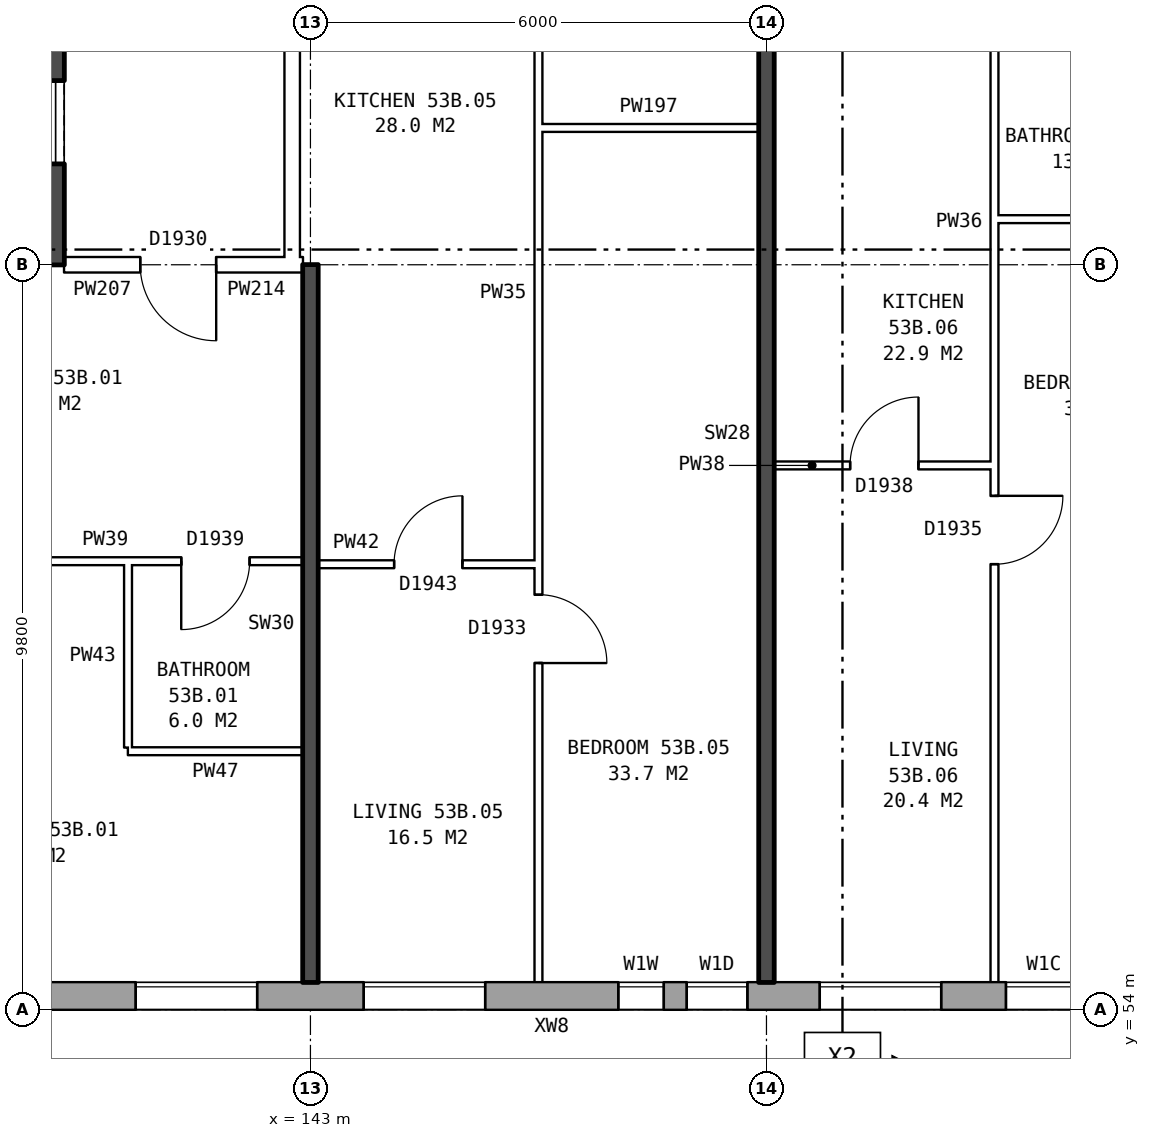
"""IFC4 building model, lengths in metres.
Left out: names, types, materials, properties, quantities, classifications, styles, units other than length and angle.
Written with IfcOpenShell. Run it as: python <this file> out.ifc"""

import sys

from ifc_helpers import new_model, si_unit, direction, frame, frame_2d, origin, place, context, subcontext, project, spatial, rectangle, extrude, element, fill, save


model = new_model("IFC4")
c1 = context("Model", 3, precision=1e-05, world=origin(), true_north=direction((0.0, 1.0)))
c2 = subcontext(c1, "Body", "Model", "MODEL_VIEW")
j1 = project(units=[si_unit("LENGTHUNIT", "METRE"), si_unit("PLANEANGLEUNIT", "RADIAN")], contexts=[c1])
p1 = place(None, origin())
s1 = spatial("IfcSite", under=j1, at=p1, CompositionType="ELEMENT")
p2 = place(p1, origin())
s2 = spatial("IfcBuilding", under=s1, at=p2, CompositionType="ELEMENT")
p3 = place(p2, frame((0.0, 0.0, 188.2)))
s3 = spatial("IfcBuildingStorey", under=s2, at=p3, CompositionType="ELEMENT", Elevation=188.2)
p4 = place(p3, frame((134.075, 54.18, 0.0), z_axis=(0.0, 0.0, 1.0), x_axis=(1.0, 0.0, 0.0)))
e1 = element("IfcWall", 1, at=p4, inside=s3, PredefinedType="STANDARD", context=c2, shape_type="SweptSolid", body=[
    extrude(rectangle(XDim=33.101, YDim=0.36, at=frame_2d((16.55, 0.0))), origin(), (0.0, 0.0, 1.0), 2.85),
])
p5 = place(p4, frame((0.625, 0.0, 0.8)))
e2 = element("IfcOpeningElement", 2, at=p5, cuts=e1, PredefinedType="OPENING", context=c2, shape_type="SweptSolid", body=[
    extrude(rectangle(XDim=1.6, YDim=1.8, at=frame_2d((0.8, 0.9))), frame((0.0, 0.19, 0.0), z_axis=(0.0, -1.0, 0.0), x_axis=(1.0, 0.0, 0.0)), (0.0, 0.0, 1.0), 0.38),
])
p6 = place(p4, frame((3.625, 0.0, 0.8)))
e3 = element("IfcOpeningElement", 3, at=p6, cuts=e1, PredefinedType="OPENING", context=c2, shape_type="SweptSolid", body=[
    extrude(rectangle(XDim=1.6, YDim=1.8, at=frame_2d((0.8, 0.9))), frame((0.0, 0.19, 0.0), z_axis=(0.0, -1.0, 0.0), x_axis=(1.0, 0.0, 0.0)), (0.0, 0.0, 1.0), 0.38),
])
p7 = place(p4, frame((6.625, 0.0, 0.8)))
e4 = element("IfcOpeningElement", 4, at=p7, cuts=e1, PredefinedType="OPENING", context=c2, shape_type="SweptSolid", body=[
    extrude(rectangle(XDim=1.6, YDim=1.8, at=frame_2d((0.8, 0.9))), frame((0.0, 0.19, 0.0), z_axis=(0.0, -1.0, 0.0), x_axis=(1.0, 0.0, 0.0)), (0.0, 0.0, 1.0), 0.38),
])
p8 = place(p4, frame((9.625, 0.0, 0.8)))
e5 = element("IfcOpeningElement", 5, at=p8, cuts=e1, PredefinedType="OPENING", context=c2, shape_type="SweptSolid", body=[
    extrude(rectangle(XDim=1.6, YDim=1.8, at=frame_2d((0.8, 0.9))), frame((0.0, 0.19, 0.0), z_axis=(0.0, -1.0, 0.0), x_axis=(1.0, 0.0, 0.0)), (0.0, 0.0, 1.0), 0.38),
])
p9 = place(p4, frame((12.975, 0.0, 0.15)))
e6 = element("IfcOpeningElement", 6, at=p9, cuts=e1, PredefinedType="OPENING", context=c2, shape_type="SweptSolid", body=[
    extrude(rectangle(XDim=0.6, YDim=0.9, at=frame_2d((0.3, 0.45))), frame((0.0, 0.19, 0.0), z_axis=(0.0, -1.0, 0.0), x_axis=(1.0, 0.0, 0.0)), (0.0, 0.0, 1.0), 0.38),
])
p10 = place(p4, frame((15.625, 0.0, 0.8)))
e7 = element("IfcOpeningElement", 7, at=p10, cuts=e1, PredefinedType="OPENING", context=c2, shape_type="SweptSolid", body=[
    extrude(rectangle(XDim=1.6, YDim=1.8, at=frame_2d((0.8, 0.9))), frame((0.0, 0.19, 0.0), z_axis=(0.0, -1.0, 0.0), x_axis=(1.0, 0.0, 0.0)), (0.0, 0.0, 1.0), 0.38),
])
p11 = place(p4, frame((18.075, 0.0, 0.45)))
e8 = element("IfcOpeningElement", 8, at=p11, cuts=e1, PredefinedType="OPENING", context=c2, shape_type="SweptSolid", body=[
    extrude(rectangle(XDim=1.0, YDim=1.8, at=frame_2d((0.5, 0.9))), frame((0.0, 0.19, 0.0), z_axis=(0.0, -1.0, 0.0), x_axis=(1.0, 0.0, 0.0)), (0.0, 0.0, 1.0), 0.38),
])
p12 = place(p4, frame((21.625, 0.0, 0.8)))
e9 = element("IfcOpeningElement", 9, at=p12, cuts=e1, PredefinedType="OPENING", context=c2, shape_type="SweptSolid", body=[
    extrude(rectangle(XDim=1.6, YDim=1.8, at=frame_2d((0.8, 0.9))), frame((0.0, 0.19, 0.0), z_axis=(0.0, -1.0, 0.0), x_axis=(1.0, 0.0, 0.0)), (0.0, 0.0, 1.0), 0.38),
])
p13 = place(p4, frame((24.625, 0.0, 0.8)))
e10 = element("IfcOpeningElement", 10, at=p13, cuts=e1, PredefinedType="OPENING", context=c2, shape_type="SweptSolid", body=[
    extrude(rectangle(XDim=1.6, YDim=1.8, at=frame_2d((0.8, 0.9))), frame((0.0, 0.19, 0.0), z_axis=(0.0, -1.0, 0.0), x_axis=(1.0, 0.0, 0.0)), (0.0, 0.0, 1.0), 0.38),
])
p14 = place(p4, frame((27.625, 0.0, 0.8)))
e11 = element("IfcOpeningElement", 11, at=p14, cuts=e1, PredefinedType="OPENING", context=c2, shape_type="SweptSolid", body=[
    extrude(rectangle(XDim=1.6, YDim=1.8, at=frame_2d((0.8, 0.9))), frame((0.0, 0.19, 0.0), z_axis=(0.0, -1.0, 0.0), x_axis=(1.0, 0.0, 0.0)), (0.0, 0.0, 1.0), 0.38),
])
p15 = place(p4, frame((30.625, 0.0, 0.8)))
e12 = element("IfcOpeningElement", 12, at=p15, cuts=e1, PredefinedType="OPENING", context=c2, shape_type="SweptSolid", body=[
    extrude(rectangle(XDim=1.6, YDim=1.8, at=frame_2d((0.8, 0.9))), frame((0.0, 0.19, 0.0), z_axis=(0.0, -1.0, 0.0), x_axis=(1.0, 0.0, 0.0)), (0.0, 0.0, 1.0), 0.38),
])
p16 = place(p4, frame((13.875, 0.0, 0.25)))
e13 = element("IfcOpeningElement", 13, at=p16, cuts=e1, PredefinedType="OPENING", context=c2, shape_type="SweptSolid", body=[
    extrude(rectangle(XDim=0.8, YDim=1.8, at=frame_2d((0.4, 0.9))), frame((0.0, 0.19, 0.0), z_axis=(0.0, -1.0, 0.0), x_axis=(1.0, 0.0, 0.0)), (0.0, 0.0, 1.0), 0.38),
])
p17 = place(p4, frame((19.375, 0.0, 0.35)))
e14 = element("IfcOpeningElement", 14, at=p17, cuts=e1, PredefinedType="OPENING", context=c2, shape_type="SweptSolid", body=[
    extrude(rectangle(XDim=0.6, YDim=0.9, at=frame_2d((0.3, 0.45))), frame((0.0, 0.19, 0.0), z_axis=(0.0, -1.0, 0.0), x_axis=(1.0, 0.0, 0.0)), (0.0, 0.0, 1.0), 0.38),
])
p18 = place(p3, frame((139.535, 63.8, 0.0), z_axis=(0.0, 0.0, 1.0), x_axis=(0.0, 1.0, 0.0)))
e15 = element("IfcWall", 15, at=p18, inside=s3, PredefinedType="SHEAR", context=c2, shape_type="SweptSolid", body=[
    extrude(rectangle(XDim=12.4, YDim=0.45, at=frame_2d((6.2, 0.0))), origin(), (0.0, 0.0, 1.0), 2.85),
])
p19 = place(p18, frame((1.325, 0.0, 0.0)))
e16 = element("IfcOpeningElement", 16, at=p19, cuts=e15, PredefinedType="OPENING", context=c2, shape_type="SweptSolid", body=[
    extrude(rectangle(XDim=1.1, YDim=2.1, at=frame_2d((0.55, 1.05))), frame((0.0, 0.235, 0.0), z_axis=(0.0, -1.0, 0.0), x_axis=(1.0, 0.0, 0.0)), (0.0, 0.0, 1.0), 0.47),
])
p20 = place(p18, frame((3.6, 0.0, 0.0)))
e17 = element("IfcOpeningElement", 17, at=p20, cuts=e15, PredefinedType="OPENING", context=c2, shape_type="SweptSolid", body=[
    extrude(rectangle(XDim=1.1, YDim=2.1, at=frame_2d((0.55, 1.05))), frame((0.0, 0.235, 0.0), z_axis=(0.0, -1.0, 0.0), x_axis=(1.0, 0.0, 0.0)), (0.0, 0.0, 1.0), 0.47),
])
p21 = place(p18, frame((5.8, 0.0, 0.0)))
e18 = element("IfcOpeningElement", 18, at=p21, cuts=e15, PredefinedType="OPENING", context=c2, shape_type="SweptSolid", body=[
    extrude(rectangle(XDim=1.1, YDim=2.1, at=frame_2d((0.55, 1.05))), frame((0.0, 0.235, 0.0), z_axis=(0.0, -1.0, 0.0), x_axis=(1.0, 0.0, 0.0)), (0.0, 0.0, 1.0), 0.47),
])
p22 = place(p18, frame((9.9, 0.0, 0.0)))
e19 = element("IfcOpeningElement", 19, at=p22, cuts=e15, PredefinedType="OPENING", context=c2, shape_type="SweptSolid", body=[
    extrude(rectangle(XDim=1.1, YDim=2.1, at=frame_2d((0.55, 1.05))), frame((0.0, 0.235, 0.0), z_axis=(0.0, -1.0, 0.0), x_axis=(1.0, 0.0, 0.0)), (0.0, 0.0, 1.0), 0.47),
])
p23 = place(p18, frame((8.125, 0.0, 0.0)))
e20 = element("IfcOpeningElement", 20, at=p23, cuts=e15, PredefinedType="OPENING", context=c2, shape_type="SweptSolid", body=[
    extrude(rectangle(XDim=0.85, YDim=2.1, at=frame_2d((0.425, 1.05))), frame((0.0, 0.235, 0.0), z_axis=(0.0, -1.0, 0.0), x_axis=(1.0, 0.0, 0.0)), (0.0, 0.0, 1.0), 0.47),
])
p24 = place(p3, frame((142.76, 63.9, 0.0), z_axis=(0.0, 0.0, 1.0), x_axis=(0.0, 1.0, 0.0)))
e21 = element("IfcWall", 21, at=p24, inside=s3, PredefinedType="PARTITIONING", context=c2, shape_type="SweptSolid", body=[
    extrude(rectangle(XDim=12.2, YDim=0.2, at=frame_2d((6.1, 0.0))), origin(), (0.0, 0.0, 1.0), 2.85),
])
p25 = place(p24, frame((5.1, 0.0, 0.0)))
e22 = element("IfcOpeningElement", 22, at=p25, cuts=e21, PredefinedType="OPENING", context=c2, shape_type="SweptSolid", body=[
    extrude(rectangle(XDim=2.0, YDim=2.1, at=frame_2d((1.0, 1.05))), frame((0.0, 0.11, 0.0), z_axis=(0.0, -1.0, 0.0), x_axis=(1.0, 0.0, 0.0)), (0.0, 0.0, 1.0), 0.22),
])
p26 = place(p3, frame((140.6, 57.4, 0.0), z_axis=(0.0, 0.0, 1.0), x_axis=(1.0, 0.0, 0.0)))
e23 = element("IfcWall", 23, at=p26, inside=s3, PredefinedType="PARTITIONING", context=c2, shape_type="SweptSolid", body=[
    extrude(rectangle(XDim=2.3, YDim=0.1, at=frame_2d((1.15, 0.0))), origin(), (0.0, 0.0, 1.0), 2.85),
])
p27 = place(p3, frame((143.1, 59.86, 0.0), z_axis=(0.0, 0.0, 1.0), x_axis=(1.0, 0.0, 0.0)))
e24 = element("IfcWall", 24, at=p27, inside=s3, PredefinedType="PARTITIONING", context=c2, shape_type="SweptSolid", body=[
    extrude(rectangle(XDim=2.9, YDim=0.1, at=frame_2d((1.45, 0.0))), origin(), (0.0, 0.0, 1.0), 2.85),
])
p28 = place(p27, frame((1.0, 0.0, 0.0)))
e25 = element("IfcOpeningElement", 25, at=p28, cuts=e24, PredefinedType="OPENING", context=c2, shape_type="SweptSolid", body=[
    extrude(rectangle(XDim=0.9, YDim=2.1, at=frame_2d((0.45, 1.05))), frame((0.0, 0.06, 0.0), z_axis=(0.0, -1.0, 0.0), x_axis=(1.0, 0.0, 0.0)), (0.0, 0.0, 1.0), 0.12),
])
p29 = place(p3, frame((137.1, 59.9, 0.0), z_axis=(0.0, 0.0, 1.0), x_axis=(1.0, 0.0, 0.0)))
e26 = element("IfcWall", 26, at=p29, inside=s3, PredefinedType="PARTITIONING", context=c2, shape_type="SweptSolid", body=[
    extrude(rectangle(XDim=5.8, YDim=0.1, at=frame_2d((2.9, 0.0))), origin(), (0.0, 0.0, 1.0), 2.85),
])
p30 = place(p29, frame((1.3, 0.0, 0.0)))
e27 = element("IfcOpeningElement", 27, at=p30, cuts=e26, PredefinedType="OPENING", context=c2, shape_type="SweptSolid", body=[
    extrude(rectangle(XDim=0.9, YDim=2.1, at=frame_2d((0.45, 1.05))), frame((0.0, 0.06, 0.0), z_axis=(0.0, -1.0, 0.0), x_axis=(1.0, 0.0, 0.0)), (0.0, 0.0, 1.0), 0.12),
])
p31 = place(p29, frame((4.2, 0.0, 0.0)))
e28 = element("IfcOpeningElement", 28, at=p31, cuts=e26, PredefinedType="OPENING", context=c2, shape_type="SweptSolid", body=[
    extrude(rectangle(XDim=0.9, YDim=2.1, at=frame_2d((0.45, 1.05))), frame((0.0, 0.06, 0.0), z_axis=(0.0, -1.0, 0.0), x_axis=(1.0, 0.0, 0.0)), (0.0, 0.0, 1.0), 0.12),
])
p32 = place(p3, frame((149.1, 61.16, 0.0), z_axis=(0.0, 0.0, 1.0), x_axis=(1.0, 0.0, 0.0)))
e29 = element("IfcWall", 29, at=p32, inside=s3, PredefinedType="PARTITIONING", context=c2, shape_type="SweptSolid", body=[
    extrude(rectangle(XDim=2.9, YDim=0.1, at=frame_2d((1.45, 0.0))), origin(), (0.0, 0.0, 1.0), 2.85),
])
p33 = place(p32, frame((1.0, 0.0, 0.0)))
e30 = element("IfcOpeningElement", 30, at=p33, cuts=e29, PredefinedType="OPENING", context=c2, shape_type="SweptSolid", body=[
    extrude(rectangle(XDim=0.9, YDim=2.1, at=frame_2d((0.45, 1.05))), frame((0.0, 0.06, 0.0), z_axis=(0.0, -1.0, 0.0), x_axis=(1.0, 0.0, 0.0)), (0.0, 0.0, 1.0), 0.12),
])
p34 = place(p3, frame((139.76, 63.8, 0.0), z_axis=(0.0, 0.0, 1.0), x_axis=(1.0, 0.0, 0.0)))
e31 = element("IfcWall", 31, at=p34, inside=s3, PredefinedType="PARTITIONING", context=c2, shape_type="SweptSolid", body=[
    extrude(rectangle(XDim=3.0, YDim=0.2, at=frame_2d((1.5, 0.0))), origin(), (0.0, 0.0, 1.0), 2.85),
])
p35 = place(p34, frame((1.0, 0.0, 0.0)))
e32 = element("IfcOpeningElement", 32, at=p35, cuts=e31, PredefinedType="OPENING", context=c2, shape_type="SweptSolid", body=[
    extrude(rectangle(XDim=1.0, YDim=2.1, at=frame_2d((0.5, 1.05))), frame((0.0, 0.11, 0.0), z_axis=(0.0, -1.0, 0.0), x_axis=(1.0, 0.0, 0.0)), (0.0, 0.0, 1.0), 0.22),
])
p36 = place(p3, frame((142.76, 63.8, 0.0), z_axis=(0.0, 0.0, 1.0), x_axis=(1.0, 0.0, 0.0)))
e33 = element("IfcWall", 33, at=p36, inside=s3, PredefinedType="PARTITIONING", context=c2, shape_type="SweptSolid", body=[
    extrude(rectangle(XDim=0.14, YDim=0.2, at=frame_2d((0.07, 0.0))), origin(), (0.0, 0.0, 1.0), 2.85),
])
for number, where, z_axis, x_axis in (
    (34, (152.0, 64.4, 0.0), (0.0, 0.0, 1.0), (1.0, 0.0, 0.0)),
    (35, (146.0, 65.6, 0.0), (0.0, 0.0, 1.0), (1.0, 0.0, 0.0)),
):
    element("IfcWall", number, at=place(p3, frame(where, z_axis=z_axis, x_axis=x_axis)), inside=s3, PredefinedType="PARTITIONING", context=c2, shape_type="SweptSolid", body=[
        extrude(rectangle(XDim=2.9, YDim=0.1, at=frame_2d((1.45, 0.0))), origin(), (0.0, 0.0, 1.0), 2.85),
    ])
p37 = place(p3, frame((140.6, 57.45, 0.0), z_axis=(0.0, 0.0, 1.0), x_axis=(0.0, 1.0, 0.0)))
e36 = element("IfcWall", 36, at=p37, inside=s3, PredefinedType="PARTITIONING", context=c2, shape_type="SweptSolid", body=[
    extrude(rectangle(XDim=2.4, YDim=0.1, at=frame_2d((1.2, 0.0))), origin(), (0.0, 0.0, 1.0), 2.85),
])
p38 = place(p3, frame((143.0, 54.36, 0.0), z_axis=(0.0, 0.0, 1.0), x_axis=(0.0, 1.0, 0.0)))
e37 = element("IfcWall", 37, at=p38, inside=s3, PredefinedType="SOLIDWALL", context=c2, shape_type="SweptSolid", body=[
    extrude(rectangle(XDim=9.44, YDim=0.2, at=frame_2d((4.72, 0.0))), origin(), (0.0, 0.0, 1.0), 2.85),
])
p39 = place(p3, frame((146.0, 54.36, 0.0), z_axis=(0.0, 0.0, 1.0), x_axis=(0.0, 1.0, 0.0)))
e38 = element("IfcWall", 38, at=p39, inside=s3, PredefinedType="PARTITIONING", context=c2, shape_type="SweptSolid", body=[
    extrude(rectangle(XDim=14.34, YDim=0.1, at=frame_2d((7.17, 0.0))), origin(), (0.0, 0.0, 1.0), 2.85),
])
p40 = place(p39, frame((4.2, 0.0, 0.0)))
e39 = element("IfcOpeningElement", 39, at=p40, cuts=e38, PredefinedType="OPENING", context=c2, shape_type="SweptSolid", body=[
    extrude(rectangle(XDim=0.9, YDim=2.1, at=frame_2d((0.45, 1.05))), frame((0.0, 0.06, 0.0), z_axis=(0.0, -1.0, 0.0), x_axis=(1.0, 0.0, 0.0)), (0.0, 0.0, 1.0), 0.12),
])
p41 = place(p39, frame((13.04, 0.0, 0.0)))
e40 = element("IfcOpeningElement", 40, at=p41, cuts=e38, PredefinedType="OPENING", context=c2, shape_type="SweptSolid", body=[
    extrude(rectangle(XDim=0.9, YDim=2.1, at=frame_2d((0.45, 1.05))), frame((0.0, 0.06, 0.0), z_axis=(0.0, -1.0, 0.0), x_axis=(1.0, 0.0, 0.0)), (0.0, 0.0, 1.0), 0.12),
])
p42 = place(p3, frame((149.0, 54.36, 0.0), z_axis=(0.0, 0.0, 1.0), x_axis=(0.0, 1.0, 0.0)))
e41 = element("IfcWall", 41, at=p42, inside=s3, PredefinedType="SOLIDWALL", context=c2, shape_type="SweptSolid", body=[
    extrude(rectangle(XDim=14.44, YDim=0.2, at=frame_2d((7.22, 0.0))), origin(), (0.0, 0.0, 1.0), 2.85),
])
p43 = place(p3, frame((152.0, 54.36, 0.0), z_axis=(0.0, 0.0, 1.0), x_axis=(0.0, 1.0, 0.0)))
e42 = element("IfcWall", 42, at=p43, inside=s3, PredefinedType="PARTITIONING", context=c2, shape_type="SweptSolid", body=[
    extrude(rectangle(XDim=14.34, YDim=0.1, at=frame_2d((7.17, 0.0))), origin(), (0.0, 0.0, 1.0), 2.85),
])
p44 = place(p43, frame((5.5, 0.0, 0.0)))
e43 = element("IfcOpeningElement", 43, at=p44, cuts=e42, PredefinedType="OPENING", context=c2, shape_type="SweptSolid", body=[
    extrude(rectangle(XDim=0.9, YDim=2.1, at=frame_2d((0.45, 1.05))), frame((0.0, 0.06, 0.0), z_axis=(0.0, -1.0, 0.0), x_axis=(1.0, 0.0, 0.0)), (0.0, 0.0, 1.0), 0.12),
])
p45 = place(p43, frame((13.04, 0.0, 0.0)))
e44 = element("IfcOpeningElement", 44, at=p45, cuts=e42, PredefinedType="OPENING", context=c2, shape_type="SweptSolid", body=[
    extrude(rectangle(XDim=0.9, YDim=2.1, at=frame_2d((0.45, 1.05))), frame((0.0, 0.06, 0.0), z_axis=(0.0, -1.0, 0.0), x_axis=(1.0, 0.0, 0.0)), (0.0, 0.0, 1.0), 0.12),
])
p46 = place(p7, origin())
e45 = element("IfcWindow", 45, at=p46, inside=s3, PartitioningType="SINGLE_PANEL", PredefinedType="WINDOW", context=c2, shape_type="SweptSolid", body=[
    extrude(rectangle(XDim=1.6, YDim=1.8, at=frame_2d((0.8, 0.9))), frame((0.0, 0.15, 0.0), z_axis=(0.0, -1.0, 0.0), x_axis=(1.0, 0.0, 0.0)), (0.0, 0.0, 1.0), 0.06),
])
fill(e4, e45)
p47 = place(p8, origin())
e46 = element("IfcWindow", 46, at=p47, inside=s3, PartitioningType="SINGLE_PANEL", PredefinedType="WINDOW", context=c2, shape_type="SweptSolid", body=[
    extrude(rectangle(XDim=1.6, YDim=1.8, at=frame_2d((0.8, 0.9))), frame((0.0, 0.15, 0.0), z_axis=(0.0, -1.0, 0.0), x_axis=(1.0, 0.0, 0.0)), (0.0, 0.0, 1.0), 0.06),
])
fill(e5, e46)
p48 = place(p9, origin())
e47 = element("IfcWindow", 47, at=p48, inside=s3, PartitioningType="SINGLE_PANEL", PredefinedType="WINDOW", context=c2, shape_type="SweptSolid", body=[
    extrude(rectangle(XDim=0.6, YDim=0.9, at=frame_2d((0.3, 0.45))), frame((0.0, 0.15, 0.0), z_axis=(0.0, -1.0, 0.0), x_axis=(1.0, 0.0, 0.0)), (0.0, 0.0, 1.0), 0.06),
])
fill(e6, e47)
p49 = place(p10, origin())
e48 = element("IfcWindow", 48, at=p49, inside=s3, PartitioningType="SINGLE_PANEL", PredefinedType="WINDOW", context=c2, shape_type="SweptSolid", body=[
    extrude(rectangle(XDim=1.6, YDim=1.8, at=frame_2d((0.8, 0.9))), frame((0.0, 0.15, 0.0), z_axis=(0.0, -1.0, 0.0), x_axis=(1.0, 0.0, 0.0)), (0.0, 0.0, 1.0), 0.06),
])
fill(e7, e48)
p50 = place(p11, origin())
e49 = element("IfcWindow", 49, at=p50, inside=s3, PartitioningType="SINGLE_PANEL", PredefinedType="WINDOW", context=c2, shape_type="SweptSolid", body=[
    extrude(rectangle(XDim=1.0, YDim=1.8, at=frame_2d((0.5, 0.9))), frame((0.0, 0.15, 0.0), z_axis=(0.0, -1.0, 0.0), x_axis=(1.0, 0.0, 0.0)), (0.0, 0.0, 1.0), 0.06),
])
fill(e8, e49)
p51 = place(p35, frame((1.0, 0.0, 0.0), z_axis=(0.0, 0.0, 1.0), x_axis=(-1.0, 0.0, 0.0)))
e50 = element("IfcDoor", 50, at=p51, inside=s3, OperationType="SINGLE_SWING_LEFT", PredefinedType="DOOR", context=c2, shape_type="SweptSolid", body=[
    extrude(rectangle(XDim=1.0, YDim=2.1, at=frame_2d((0.5, 1.05))), frame((0.0, 0.025, 0.0), z_axis=(0.0, -1.0, 0.0), x_axis=(1.0, 0.0, 0.0)), (0.0, 0.0, 1.0), 0.05),
])
fill(e32, e50)
p52 = place(p31, frame((0.9, 0.0, 0.0), z_axis=(0.0, 0.0, 1.0), x_axis=(-1.0, 0.0, 0.0)))
e51 = element("IfcDoor", 51, at=p52, inside=s3, OperationType="SINGLE_SWING_RIGHT", PredefinedType="DOOR", context=c2, shape_type="SweptSolid", body=[
    extrude(rectangle(XDim=0.9, YDim=2.1, at=frame_2d((0.45, 1.05))), frame((0.0, 0.025, 0.0), z_axis=(0.0, -1.0, 0.0), x_axis=(1.0, 0.0, 0.0)), (0.0, 0.0, 1.0), 0.05),
])
fill(e28, e51)
p53 = place(p40, frame((0.9, 0.0, 0.0), z_axis=(0.0, 0.0, 1.0), x_axis=(-1.0, 0.0, 0.0)))
e52 = element("IfcDoor", 52, at=p53, inside=s3, OperationType="SINGLE_SWING_RIGHT", PredefinedType="DOOR", context=c2, shape_type="SweptSolid", body=[
    extrude(rectangle(XDim=0.9, YDim=2.1, at=frame_2d((0.45, 1.05))), frame((0.0, 0.025, 0.0), z_axis=(0.0, -1.0, 0.0), x_axis=(1.0, 0.0, 0.0)), (0.0, 0.0, 1.0), 0.05),
])
fill(e39, e52)
p54 = place(p28, origin())
e53 = element("IfcDoor", 53, at=p54, inside=s3, OperationType="SINGLE_SWING_RIGHT", PredefinedType="DOOR", context=c2, shape_type="SweptSolid", body=[
    extrude(rectangle(XDim=0.9, YDim=2.1, at=frame_2d((0.45, 1.05))), frame((0.0, 0.025, 0.0), z_axis=(0.0, -1.0, 0.0), x_axis=(1.0, 0.0, 0.0)), (0.0, 0.0, 1.0), 0.05),
])
fill(e25, e53)
p55 = place(p44, frame((0.9, 0.0, 0.0), z_axis=(0.0, 0.0, 1.0), x_axis=(-1.0, 0.0, 0.0)))
e54 = element("IfcDoor", 54, at=p55, inside=s3, OperationType="SINGLE_SWING_LEFT", PredefinedType="DOOR", context=c2, shape_type="SweptSolid", body=[
    extrude(rectangle(XDim=0.9, YDim=2.1, at=frame_2d((0.45, 1.05))), frame((0.0, 0.025, 0.0), z_axis=(0.0, -1.0, 0.0), x_axis=(1.0, 0.0, 0.0)), (0.0, 0.0, 1.0), 0.05),
])
fill(e43, e54)
p56 = place(p33, origin())
e55 = element("IfcDoor", 55, at=p56, inside=s3, OperationType="SINGLE_SWING_RIGHT", PredefinedType="DOOR", context=c2, shape_type="SweptSolid", body=[
    extrude(rectangle(XDim=0.9, YDim=2.1, at=frame_2d((0.45, 1.05))), frame((0.0, 0.025, 0.0), z_axis=(0.0, -1.0, 0.0), x_axis=(1.0, 0.0, 0.0)), (0.0, 0.0, 1.0), 0.05),
])
fill(e30, e55)
p57 = place(p16, origin())
e56 = element("IfcWindow", 56, at=p57, inside=s3, PartitioningType="SINGLE_PANEL", PredefinedType="WINDOW", context=c2, shape_type="SweptSolid", body=[
    extrude(rectangle(XDim=0.8, YDim=1.8, at=frame_2d((0.4, 0.9))), frame((0.0, 0.15, 0.0), z_axis=(0.0, -1.0, 0.0), x_axis=(1.0, 0.0, 0.0)), (0.0, 0.0, 1.0), 0.06),
])
fill(e13, e56)
save(model, sys.argv[1])
